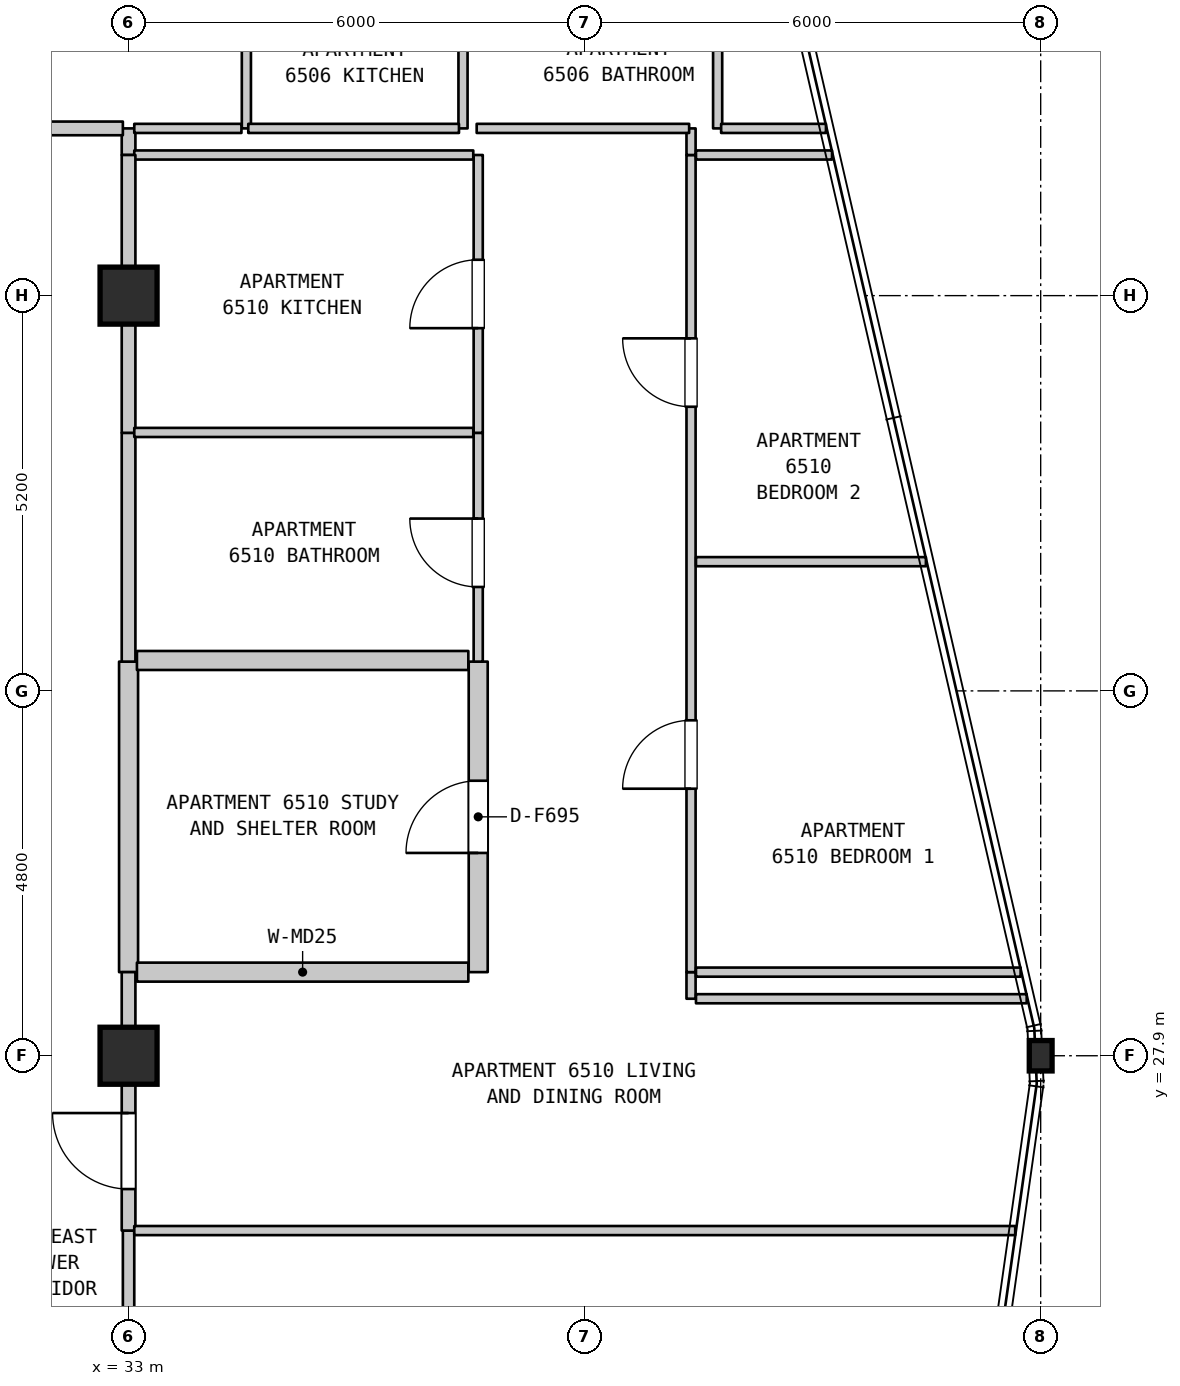
"""IFC4 building model, lengths in metres.
Left out: names, types, materials, properties, quantities, classifications, styles, units other than length and angle.
Written with IfcOpenShell. Run it as: python <this file> out.ifc"""

import sys

from ifc_helpers import new_model, si_unit, direction, frame, frame_2d, origin, origin_2d, place, context, subcontext, project, spatial, rectangle, i_section, extrude, element, fill, save


model = new_model("IFC4")
c1 = context("Model", 3, precision=1e-05, world=origin(), true_north=direction((0.0, 1.0)))
c2 = subcontext(c1, "Body", "Model", "MODEL_VIEW")
j1 = project(units=[si_unit("LENGTHUNIT", "METRE"), si_unit("PLANEANGLEUNIT", "RADIAN")], contexts=[c1])
p1 = place(None, origin())
s1 = spatial("IfcSite", under=j1, at=p1, CompositionType="ELEMENT")
p2 = place(p1, origin())
s2 = spatial("IfcBuilding", under=s1, at=p2, CompositionType="ELEMENT")
p3 = place(p2, frame((0.0, 0.0, 262.1)))
s3 = spatial("IfcBuildingStorey", under=s2, at=p3, CompositionType="ELEMENT", Elevation=262.1)
for number, where, z_axis, x_axis in (
    (1, (33.0, 27.9, 0.0), (0.0, 0.0, 1.0), (1.0, 0.0, 0.0)),
    (2, (33.0, 37.9, 0.0), (0.0, 0.0, 1.0), (1.0, 0.0, 0.0)),
):
    element("IfcColumn", number, at=place(p3, frame(where, z_axis=z_axis, x_axis=x_axis)), inside=s3, PredefinedType="COLUMN", context=c2, shape_type="SweptSolid", body=[
        extrude(rectangle(XDim=0.75, YDim=0.75, at=origin_2d()), origin(), (0.0, 0.0, 1.0), 3.7),
    ])
p4 = place(p3, frame((45.0, 27.9, 0.0), z_axis=(0.0, 0.0, 1.0), x_axis=(1.0, 0.0, 0.0)))
e3 = element("IfcColumn", 3, at=p4, inside=s3, PredefinedType="COLUMN", context=c2, shape_type="SweptSolid", body=[
    extrude(i_section(OverallWidth=0.3, OverallDepth=0.4, WebThickness=0.013, FlangeThickness=0.024, FilletRadius=0.027, at=origin_2d()), origin(), (0.0, 0.0, 1.0), 3.7),
])
p5 = place(p3, frame((33.0, 19.5, 0.0), z_axis=(0.0, 0.0, 1.0), x_axis=(0.0, 1.0, 0.0)))
e4 = element("IfcWall", 4, at=p5, inside=s3, PredefinedType="STANDARD", context=c2, shape_type="SweptSolid", body=[
    extrude(rectangle(XDim=6.1, YDim=0.15, at=frame_2d((3.05, 0.0))), origin(), (0.0, 0.0, 1.0), 3.1),
])
p6 = place(p5, frame((1.545, 0.0, 0.0)))
e5 = element("IfcOpeningElement", 5, at=p6, cuts=e4, PredefinedType="OPENING", context=c2, shape_type="SweptSolid", body=[
    extrude(rectangle(XDim=1.0, YDim=2.15, at=frame_2d((0.5, 1.075))), frame((0.0, 0.085, 0.0), z_axis=(0.0, -1.0, 0.0), x_axis=(1.0, 0.0, 0.0)), (0.0, 0.0, 1.0), 0.17),
])
p7 = place(p3, frame((33.0, 25.6, 0.0), z_axis=(0.0, 0.0, 1.0), x_axis=(0.0, 1.0, 0.0)))
e6 = element("IfcWall", 6, at=p7, inside=s3, PredefinedType="STANDARD", context=c2, shape_type="SweptSolid", body=[
    extrude(rectangle(XDim=2.3, YDim=0.18, at=frame_2d((1.15, 0.0))), origin(), (0.0, 0.0, 1.0), 3.1),
])
p8 = place(p7, frame((0.546, 0.0, 0.0)))
e7 = element("IfcOpeningElement", 7, at=p8, cuts=e6, PredefinedType="OPENING", context=c2, shape_type="SweptSolid", body=[
    extrude(rectangle(XDim=1.0, YDim=2.15, at=frame_2d((0.5, 1.075))), frame((0.0, 0.1, 0.0), z_axis=(0.0, -1.0, 0.0), x_axis=(1.0, 0.0, 0.0)), (0.0, 0.0, 1.0), 0.2),
])
p9 = place(p3, frame((33.0, 29.0, 0.0), z_axis=(0.0, 0.0, 1.0), x_axis=(0.0, 1.0, 0.0)))
e8 = element("IfcWall", 8, at=p9, inside=s3, PredefinedType="STANDARD", context=c2, shape_type="SweptSolid", body=[
    extrude(rectangle(XDim=4.085, YDim=0.25, at=frame_2d((2.042, 0.0))), origin(), (0.0, 0.0, 1.0), 2.89),
])
p10 = place(p3, frame((33.0, 33.085, 0.0), z_axis=(0.0, 0.0, 1.0), x_axis=(0.0, 1.0, 0.0)))
e9 = element("IfcWall", 9, at=p10, inside=s3, PredefinedType="STANDARD", context=c2, shape_type="SweptSolid", body=[
    extrude(rectangle(XDim=3.01, YDim=0.18, at=frame_2d((1.505, 0.0))), origin(), (0.0, 0.0, 1.0), 2.89),
])
p11 = place(p3, frame((33.0, 36.095, 0.0), z_axis=(0.0, 0.0, 1.0), x_axis=(0.0, 1.0, 0.0)))
e10 = element("IfcWall", 10, at=p11, inside=s3, PredefinedType="STANDARD", context=c2, shape_type="SweptSolid", body=[
    extrude(rectangle(XDim=1.805, YDim=0.18, at=frame_2d((0.902, 0.0))), origin(), (0.0, 0.0, 1.0), 2.89),
])
p12 = place(p3, frame((33.0, 39.75, 0.0), z_axis=(0.0, 0.0, 1.0), x_axis=(0.0, 1.0, 0.0)))
e11 = element("IfcWall", 11, at=p12, inside=s3, PredefinedType="STANDARD", context=c2, shape_type="SweptSolid", body=[
    extrude(rectangle(XDim=0.35, YDim=0.18, at=frame_2d((0.175, 0.0))), origin(), (0.0, 0.0, 1.0), 3.39),
])
for number, where, z_axis, x_axis in (
    (12, (34.55, 40.1, 0.0), (0.0, 0.0, 1.0), (0.0, 1.0, 0.0)),
    (13, (37.4, 40.1, 0.0), (0.0, 0.0, 1.0), (0.0, 1.0, 0.0)),
):
    element("IfcWall", number, at=place(p3, frame(where, z_axis=z_axis, x_axis=x_axis)), inside=s3, PredefinedType="PARTITIONING", context=c2, shape_type="SweptSolid", body=[
        extrude(rectangle(XDim=2.3, YDim=0.12, at=frame_2d((1.15, 0.0))), origin(), (0.0, 0.0, 1.0), 3.39),
    ])
p13 = place(p3, frame((37.6, 29.0, 0.0), z_axis=(0.0, 0.0, 1.0), x_axis=(0.0, 1.0, 0.0)))
e14 = element("IfcWall", 14, at=p13, inside=s3, PredefinedType="STANDARD", context=c2, shape_type="SweptSolid", body=[
    extrude(rectangle(XDim=4.085, YDim=0.25, at=frame_2d((2.042, 0.0))), origin(), (0.0, 0.0, 1.0), 3.39),
])
p14 = place(p13, frame((1.568, 0.0, 0.0)))
e15 = element("IfcOpeningElement", 15, at=p14, cuts=e14, PredefinedType="OPENING", context=c2, shape_type="SweptSolid", body=[
    extrude(rectangle(XDim=0.95, YDim=2.15, at=frame_2d((0.475, 1.075))), frame((0.0, 0.135, 0.0), z_axis=(0.0, -1.0, 0.0), x_axis=(1.0, 0.0, 0.0)), (0.0, 0.0, 1.0), 0.27),
])
p15 = place(p3, frame((37.6, 33.085, 0.0), z_axis=(0.0, 0.0, 1.0), x_axis=(0.0, 1.0, 0.0)))
e16 = element("IfcWall", 16, at=p15, inside=s3, PredefinedType="PARTITIONING", context=c2, shape_type="SweptSolid", body=[
    extrude(rectangle(XDim=3.01, YDim=0.12, at=frame_2d((1.505, 0.0))), origin(), (0.0, 0.0, 1.0), 3.39),
])
p16 = place(p15, frame((0.982, 0.0, 0.0)))
e17 = element("IfcOpeningElement", 17, at=p16, cuts=e16, PredefinedType="OPENING", context=c2, shape_type="SweptSolid", body=[
    extrude(rectangle(XDim=0.9, YDim=2.1, at=frame_2d((0.45, 1.05))), frame((0.0, 0.07, 0.0), z_axis=(0.0, -1.0, 0.0), x_axis=(1.0, 0.0, 0.0)), (0.0, 0.0, 1.0), 0.14),
])
p17 = place(p3, frame((37.6, 36.095, 0.0), z_axis=(0.0, 0.0, 1.0), x_axis=(0.0, 1.0, 0.0)))
e18 = element("IfcWall", 18, at=p17, inside=s3, PredefinedType="PARTITIONING", context=c2, shape_type="SweptSolid", body=[
    extrude(rectangle(XDim=3.655, YDim=0.12, at=frame_2d((1.828, 0.0))), origin(), (0.0, 0.0, 1.0), 3.39),
])
p18 = place(p17, frame((1.377, 0.0, 0.0)))
e19 = element("IfcOpeningElement", 19, at=p18, cuts=e18, PredefinedType="OPENING", context=c2, shape_type="SweptSolid", body=[
    extrude(rectangle(XDim=0.9, YDim=2.15, at=frame_2d((0.45, 1.075))), frame((0.0, 0.07, 0.0), z_axis=(0.0, -1.0, 0.0), x_axis=(1.0, 0.0, 0.0)), (0.0, 0.0, 1.0), 0.14),
])
p19 = place(p3, frame((40.4, 28.65, 0.0), z_axis=(0.0, 0.0, 1.0), x_axis=(0.0, 1.0, 0.0)))
e20 = element("IfcWall", 20, at=p19, inside=s3, PredefinedType="PARTITIONING", context=c2, shape_type="SweptSolid", body=[
    extrude(rectangle(XDim=0.35, YDim=0.12, at=frame_2d((0.175, 0.0))), origin(), (0.0, 0.0, 1.0), 3.39),
])
p20 = place(p3, frame((40.4, 29.0, 0.0), z_axis=(0.0, 0.0, 1.0), x_axis=(0.0, 1.0, 0.0)))
e21 = element("IfcWall", 21, at=p20, inside=s3, PredefinedType="PARTITIONING", context=c2, shape_type="SweptSolid", body=[
    extrude(rectangle(XDim=10.75, YDim=0.12, at=frame_2d((5.375, 0.0))), origin(), (0.0, 0.0, 1.0), 3.39),
])
p21 = place(p20, frame((2.413, 0.0, 0.0)))
e22 = element("IfcOpeningElement", 22, at=p21, cuts=e21, PredefinedType="OPENING", context=c2, shape_type="SweptSolid", body=[
    extrude(rectangle(XDim=0.9, YDim=2.15, at=frame_2d((0.45, 1.075))), frame((0.0, 0.07, 0.0), z_axis=(0.0, -1.0, 0.0), x_axis=(1.0, 0.0, 0.0)), (0.0, 0.0, 1.0), 0.14),
])
p22 = place(p20, frame((7.438, 0.0, 0.0)))
e23 = element("IfcOpeningElement", 23, at=p22, cuts=e21, PredefinedType="OPENING", context=c2, shape_type="SweptSolid", body=[
    extrude(rectangle(XDim=0.9, YDim=2.15, at=frame_2d((0.45, 1.075))), frame((0.0, 0.07, 0.0), z_axis=(0.0, -1.0, 0.0), x_axis=(1.0, 0.0, 0.0)), (0.0, 0.0, 1.0), 0.14),
])
p23 = place(p3, frame((40.4, 39.75, 0.0), z_axis=(0.0, 0.0, 1.0), x_axis=(0.0, 1.0, 0.0)))
e24 = element("IfcWall", 24, at=p23, inside=s3, PredefinedType="PARTITIONING", context=c2, shape_type="SweptSolid", body=[
    extrude(rectangle(XDim=0.35, YDim=0.12, at=frame_2d((0.175, 0.0))), origin(), (0.0, 0.0, 1.0), 3.39),
])
p24 = place(p3, frame((40.75, 40.1, 0.0), z_axis=(0.0, 0.0, 1.0), x_axis=(0.0, 1.0, 0.0)))
e25 = element("IfcWall", 25, at=p24, inside=s3, PredefinedType="PARTITIONING", context=c2, shape_type="SweptSolid", body=[
    extrude(rectangle(XDim=2.3, YDim=0.12, at=frame_2d((1.15, 0.0))), origin(), (0.0, 0.0, 1.0), 3.39),
])
p25 = place(p3, frame((33.075, 25.6, 0.0), z_axis=(0.0, 0.0, 1.0), x_axis=(1.0, 0.0, 0.0)))
e26 = element("IfcWall", 26, at=p25, inside=s3, PredefinedType="PARTITIONING", context=c2, shape_type="SweptSolid", body=[
    extrude(rectangle(XDim=11.59, YDim=0.12, at=frame_2d((5.795, 0.0))), origin(), (0.0, 0.0, 1.0), 3.39),
])
p26 = place(p3, frame((40.465, 28.65, 0.0), z_axis=(0.0, 0.0, 1.0), x_axis=(1.0, 0.0, 0.0)))
e27 = element("IfcWall", 27, at=p26, inside=s3, PredefinedType="PARTITIONING", context=c2, shape_type="SweptSolid", body=[
    extrude(rectangle(XDim=4.351, YDim=0.12, at=frame_2d((2.175, 0.0))), origin(), (0.0, 0.0, 1.0), 3.39),
])
p27 = place(p3, frame((33.11, 29.0, 0.0), z_axis=(0.0, 0.0, 1.0), x_axis=(1.0, 0.0, 0.0)))
e28 = element("IfcWall", 28, at=p27, inside=s3, PredefinedType="STANDARD", context=c2, shape_type="SweptSolid", body=[
    extrude(rectangle(XDim=4.36, YDim=0.25, at=frame_2d((2.18, 0.0))), origin(), (0.0, 0.0, 1.0), 3.39),
])
p28 = place(p3, frame((40.465, 29.0, 0.0), z_axis=(0.0, 0.0, 1.0), x_axis=(1.0, 0.0, 0.0)))
e29 = element("IfcWall", 29, at=p28, inside=s3, PredefinedType="PARTITIONING", context=c2, shape_type="SweptSolid", body=[
    extrude(rectangle(XDim=4.271, YDim=0.12, at=frame_2d((2.135, 0.0))), origin(), (0.0, 0.0, 1.0), 3.39),
])
p29 = place(p3, frame((33.11, 33.1, 0.0), z_axis=(0.0, 0.0, 1.0), x_axis=(1.0, 0.0, 0.0)))
e30 = element("IfcWall", 30, at=p29, inside=s3, PredefinedType="STANDARD", context=c2, shape_type="SweptSolid", body=[
    extrude(rectangle(XDim=4.36, YDim=0.25, at=frame_2d((2.18, 0.0))), origin(), (0.0, 0.0, 1.0), 3.39),
])
p30 = place(p3, frame((40.465, 34.4, 0.0), z_axis=(0.0, 0.0, 1.0), x_axis=(1.0, 0.0, 0.0)))
e31 = element("IfcWall", 31, at=p30, inside=s3, PredefinedType="PARTITIONING", context=c2, shape_type="SweptSolid", body=[
    extrude(rectangle(XDim=3.025, YDim=0.12, at=frame_2d((1.512, 0.0))), origin(), (0.0, 0.0, 1.0), 3.39),
])
for number, where, z_axis, x_axis in (
    (32, (33.075, 36.1, 0.0), (0.0, 0.0, 1.0), (1.0, 0.0, 0.0)),
    (33, (33.075, 39.75, 0.0), (0.0, 0.0, 1.0), (1.0, 0.0, 0.0)),
):
    element("IfcWall", number, at=place(p3, frame(where, z_axis=z_axis, x_axis=x_axis)), inside=s3, PredefinedType="PARTITIONING", context=c2, shape_type="SweptSolid", body=[
        extrude(rectangle(XDim=4.46, YDim=0.12, at=frame_2d((2.23, 0.0))), origin(), (0.0, 0.0, 1.0), 3.39),
    ])
p31 = place(p3, frame((40.465, 39.75, 0.0), z_axis=(0.0, 0.0, 1.0), x_axis=(1.0, 0.0, 0.0)))
e34 = element("IfcWall", 34, at=p31, inside=s3, PredefinedType="PARTITIONING", context=c2, shape_type="SweptSolid", body=[
    extrude(rectangle(XDim=1.79, YDim=0.12, at=frame_2d((0.895, 0.0))), origin(), (0.0, 0.0, 1.0), 3.39),
])
p32 = place(p3, frame((29.395, 40.1, 0.0), z_axis=(0.0, 0.0, 1.0), x_axis=(1.0, 0.0, 0.0)))
e35 = element("IfcWall", 35, at=p32, inside=s3, PredefinedType="STANDARD", context=c2, shape_type="SweptSolid", body=[
    extrude(rectangle(XDim=3.53, YDim=0.18, at=frame_2d((1.765, 0.0))), origin(), (0.0, 0.0, 1.0), 3.39),
])
p33 = place(p32, frame((1.48, 0.0, 0.0)))
e36 = element("IfcOpeningElement", 36, at=p33, cuts=e35, PredefinedType="OPENING", context=c2, shape_type="SweptSolid", body=[
    extrude(rectangle(XDim=1.0, YDim=2.15, at=frame_2d((0.5, 1.075))), frame((0.0, 0.1, 0.0), z_axis=(0.0, -1.0, 0.0), x_axis=(1.0, 0.0, 0.0)), (0.0, 0.0, 1.0), 0.2),
])
p34 = place(p3, frame((33.075, 40.1, 0.0), z_axis=(0.0, 0.0, 1.0), x_axis=(1.0, 0.0, 0.0)))
e37 = element("IfcWall", 37, at=p34, inside=s3, PredefinedType="PARTITIONING", context=c2, shape_type="SweptSolid", body=[
    extrude(rectangle(XDim=1.41, YDim=0.12, at=frame_2d((0.705, 0.0))), origin(), (0.0, 0.0, 1.0), 3.39),
])
p35 = place(p3, frame((34.575, 40.1, 0.0), z_axis=(0.0, 0.0, 1.0), x_axis=(1.0, 0.0, 0.0)))
e38 = element("IfcWall", 38, at=p35, inside=s3, PredefinedType="PARTITIONING", context=c2, shape_type="SweptSolid", body=[
    extrude(rectangle(XDim=2.772, YDim=0.12, at=frame_2d((1.386, 0.0))), origin(), (0.0, 0.0, 1.0), 3.39),
])
p36 = place(p3, frame((37.58, 40.1, 0.0), z_axis=(0.0, 0.0, 1.0), x_axis=(1.0, 0.0, 0.0)))
e39 = element("IfcWall", 39, at=p36, inside=s3, PredefinedType="PARTITIONING", context=c2, shape_type="SweptSolid", body=[
    extrude(rectangle(XDim=2.795, YDim=0.12, at=frame_2d((1.397, 0.0))), origin(), (0.0, 0.0, 1.0), 3.39),
])
p37 = place(p3, frame((40.796, 40.1, 0.0), z_axis=(0.0, 0.0, 1.0), x_axis=(1.0, 0.0, 0.0)))
e40 = element("IfcWall", 40, at=p37, inside=s3, PredefinedType="PARTITIONING", context=c2, shape_type="SweptSolid", body=[
    extrude(rectangle(XDim=1.379, YDim=0.12, at=frame_2d((0.689, 0.0))), origin(), (0.0, 0.0, 1.0), 3.39),
])
p38 = place(p3, frame((33.0, 27.9, 0.0), z_axis=(0.0, 0.0, 1.0), x_axis=(0.0, 1.0, 0.0)))
e41 = element("IfcWall", 41, at=p38, inside=s3, PredefinedType="STANDARD", context=c2, shape_type="SweptSolid", body=[
    extrude(rectangle(XDim=1.1, YDim=0.18, at=frame_2d((0.55, 0.0))), origin(), (0.0, 0.0, 1.0), 2.89),
])
p39 = place(p3, frame((33.0, 37.9, 0.0), z_axis=(0.0, 0.0, 1.0), x_axis=(0.0, 1.0, 0.0)))
e42 = element("IfcWall", 42, at=p39, inside=s3, PredefinedType="STANDARD", context=c2, shape_type="SweptSolid", body=[
    extrude(rectangle(XDim=1.85, YDim=0.18, at=frame_2d((0.925, 0.0))), origin(), (0.0, 0.0, 1.0), 2.79),
])
p40 = place(p8, origin())
e43 = element("IfcDoor", 43, at=p40, inside=s3, OperationType="SINGLE_SWING_RIGHT", PredefinedType="DOOR", context=c2, shape_type="SweptSolid", body=[
    extrude(rectangle(XDim=1.0, YDim=2.15, at=frame_2d((0.5, 1.075))), frame((0.0, 0.025, 0.0), z_axis=(0.0, -1.0, 0.0), x_axis=(1.0, 0.0, 0.0)), (0.0, 0.0, 1.0), 0.05),
])
fill(e7, e43)
p41 = place(p14, origin())
e44 = element("IfcDoor", 44, at=p41, inside=s3, OperationType="SINGLE_SWING_LEFT", PredefinedType="DOOR", context=c2, shape_type="SweptSolid", body=[
    extrude(rectangle(XDim=0.95, YDim=2.15, at=frame_2d((0.475, 1.075))), frame((0.0, 0.025, 0.0), z_axis=(0.0, -1.0, 0.0), x_axis=(1.0, 0.0, 0.0)), (0.0, 0.0, 1.0), 0.05),
])
fill(e15, e44)
p42 = place(p16, origin())
e45 = element("IfcDoor", 45, at=p42, inside=s3, OperationType="SINGLE_SWING_RIGHT", PredefinedType="DOOR", context=c2, shape_type="SweptSolid", body=[
    extrude(rectangle(XDim=0.9, YDim=2.1, at=frame_2d((0.45, 1.05))), frame((0.0, 0.025, 0.0), z_axis=(0.0, -1.0, 0.0), x_axis=(1.0, 0.0, 0.0)), (0.0, 0.0, 1.0), 0.05),
])
fill(e17, e45)
p43 = place(p18, origin())
e46 = element("IfcDoor", 46, at=p43, inside=s3, OperationType="SINGLE_SWING_LEFT", PredefinedType="DOOR", context=c2, shape_type="SweptSolid", body=[
    extrude(rectangle(XDim=0.9, YDim=2.15, at=frame_2d((0.45, 1.075))), frame((0.0, 0.025, 0.0), z_axis=(0.0, -1.0, 0.0), x_axis=(1.0, 0.0, 0.0)), (0.0, 0.0, 1.0), 0.05),
])
fill(e19, e46)
p44 = place(p21, origin())
e47 = element("IfcDoor", 47, at=p44, inside=s3, OperationType="SINGLE_SWING_LEFT", PredefinedType="DOOR", context=c2, shape_type="SweptSolid", body=[
    extrude(rectangle(XDim=0.9, YDim=2.15, at=frame_2d((0.45, 1.075))), frame((0.0, 0.025, 0.0), z_axis=(0.0, -1.0, 0.0), x_axis=(1.0, 0.0, 0.0)), (0.0, 0.0, 1.0), 0.05),
])
fill(e22, e47)
p45 = place(p22, origin())
e48 = element("IfcDoor", 48, at=p45, inside=s3, OperationType="SINGLE_SWING_RIGHT", PredefinedType="DOOR", context=c2, shape_type="SweptSolid", body=[
    extrude(rectangle(XDim=0.9, YDim=2.15, at=frame_2d((0.45, 1.075))), frame((0.0, 0.025, 0.0), z_axis=(0.0, -1.0, 0.0), x_axis=(1.0, 0.0, 0.0)), (0.0, 0.0, 1.0), 0.05),
])
fill(e23, e48)
save(model, sys.argv[1])
